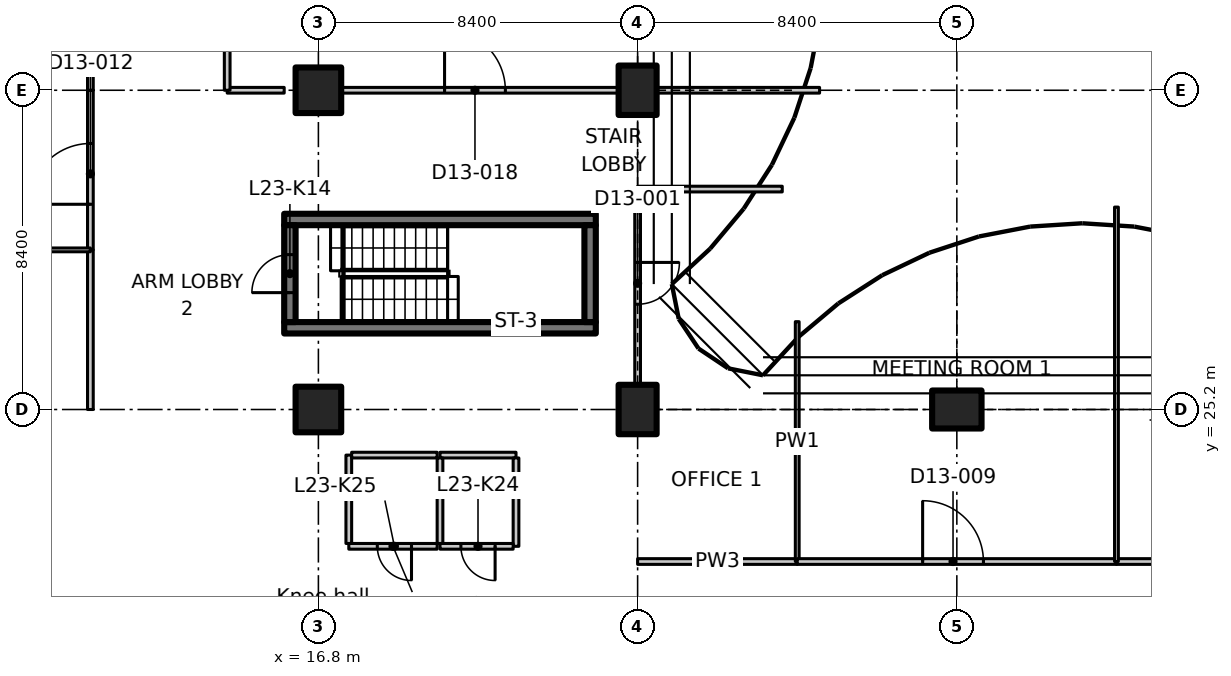
"""IFC4 building model, lengths in metres.
Left out: names, types, materials, properties, quantities, classifications, styles, units other than length and angle.
Written with IfcOpenShell. Run it as: python <this file> out.ifc"""

import sys

from ifc_helpers import new_model, si_unit, direction, frame, frame_2d, origin, origin_2d, place, context, subcontext, project, spatial, polyline, rectangle, outline, extrude, element, fill, save


model = new_model("IFC4")
c1 = context("Model", 3, precision=1e-05, world=origin(), true_north=direction((0.0, 1.0)))
c2 = subcontext(c1, "Body", "Model", "MODEL_VIEW")
j1 = project(units=[si_unit("LENGTHUNIT", "METRE"), si_unit("PLANEANGLEUNIT", "RADIAN")], contexts=[c1])
p1 = place(None, origin())
s1 = spatial("IfcSite", under=j1, at=p1, CompositionType="ELEMENT")
p2 = place(p1, origin())
s2 = spatial("IfcBuilding", under=s1, at=p2, CompositionType="ELEMENT")
p3 = place(p2, frame((0.0, 0.0, 98.9)))
s3 = spatial("IfcBuildingStorey", under=s2, at=p3, CompositionType="ELEMENT", Elevation=98.9)
for number, where, z_axis, x_axis in (
    (1, (16.8, 25.2, 0.0), (0.0, 0.0, 1.0), (1.0, 0.0, 0.0)),
    (2, (16.8, 33.6, 0.0), (0.0, 0.0, 1.0), (1.0, 0.0, 0.0)),
):
    element("IfcColumn", number, at=place(p3, frame(where, z_axis=z_axis, x_axis=x_axis)), inside=s3, PredefinedType="COLUMN", context=c2, shape_type="SweptSolid", body=[
        extrude(rectangle(XDim=1.2, YDim=1.2, at=origin_2d()), origin(), (0.0, 0.0, 1.0), 3.35),
    ])
for number, where, z_axis, x_axis in (
    (3, (25.2, 25.2, 0.0), (0.0, 0.0, 1.0), (1.0, 0.0, 0.0)),
    (4, (25.2, 33.6, 0.0), (0.0, 0.0, 1.0), (1.0, 0.0, 0.0)),
    (5, (33.6, 25.2, 0.0), (0.0, 0.0, 1.0), (0.0, 1.0, 0.0)),
):
    element("IfcColumn", number, at=place(p3, frame(where, z_axis=z_axis, x_axis=x_axis)), inside=s3, PredefinedType="COLUMN", context=c2, shape_type="SweptSolid", body=[
        extrude(rectangle(XDim=1.0, YDim=1.3, at=origin_2d()), origin(), (0.0, 0.0, 1.0), 3.35),
    ])
for number, where, z_axis, x_axis in (
    (6, (15.9, 27.35, 0.0), (0.0, 0.0, 1.0), (1.0, 0.0, 0.0)),
    (7, (15.9, 30.2, 0.0), (0.0, 0.0, 1.0), (1.0, 0.0, 0.0)),
):
    element("IfcWall", number, at=place(p3, frame(where, z_axis=z_axis, x_axis=x_axis)), inside=s3, PredefinedType="SHEAR", context=c2, shape_type="SweptSolid", body=[
        extrude(rectangle(XDim=8.2, YDim=0.3, at=frame_2d((4.1, 0.0))), origin(), (0.0, 0.0, 1.0), 3.35),
    ])
p4 = place(p3, frame((16.05, 27.5, 0.0), z_axis=(0.0, 0.0, 1.0), x_axis=(0.0, 1.0, 0.0)))
e8 = element("IfcWall", 8, at=p4, inside=s3, PredefinedType="SHEAR", context=c2, shape_type="SweptSolid", body=[
    extrude(rectangle(XDim=2.55, YDim=0.3, at=frame_2d((1.275, 0.0))), origin(), (0.0, 0.0, 1.0), 3.35),
])
p5 = place(p4, frame((0.775, 0.0, 0.0)))
e9 = element("IfcOpeningElement", 9, at=p5, cuts=e8, PredefinedType="OPENING", context=c2, shape_type="SweptSolid", body=[
    extrude(rectangle(XDim=1.0, YDim=2.1, at=frame_2d((0.5, 1.05))), frame((0.0, 0.16, 0.0), z_axis=(0.0, -1.0, 0.0), x_axis=(1.0, 0.0, 0.0)), (0.0, 0.0, 1.0), 0.32),
])
p6 = place(p3, frame((23.95, 27.5, 0.0), z_axis=(0.0, 0.0, 1.0), x_axis=(0.0, 1.0, 0.0)))
e10 = element("IfcWall", 10, at=p6, inside=s3, PredefinedType="SHEAR", context=c2, shape_type="SweptSolid", body=[
    extrude(rectangle(XDim=2.55, YDim=0.3, at=frame_2d((1.275, 0.0))), origin(), (0.0, 0.0, 1.0), 3.35),
])
p7 = place(p3, frame((20.0, 24.0, 0.0), z_axis=(0.0, 0.0, 1.0), x_axis=(1.0, 0.0, 0.0)))
e11 = element("IfcWall", 11, at=p7, inside=s3, PredefinedType="PARTITIONING", context=c2, shape_type="SweptSolid", body=[
    extrude(rectangle(XDim=2.0, YDim=0.15, at=frame_2d((1.0, 0.0))), origin(), (0.0, 0.0, 1.0), 3.35),
])
p8 = place(p3, frame((22.0, 23.925, 0.0), z_axis=(0.0, 0.0, 1.0), x_axis=(0.0, -1.0, 0.0)))
e12 = element("IfcWall", 12, at=p8, inside=s3, PredefinedType="PARTITIONING", context=c2, shape_type="SweptSolid", body=[
    extrude(rectangle(XDim=2.325, YDim=0.15, at=frame_2d((1.163, 0.0))), origin(), (0.0, 0.0, 1.0), 3.35),
])
p9 = place(p3, frame((21.925, 21.6, 0.0), z_axis=(0.0, 0.0, 1.0), x_axis=(-1.0, 0.0, 0.0)))
e13 = element("IfcWall", 13, at=p9, inside=s3, PredefinedType="PARTITIONING", context=c2, shape_type="SweptSolid", body=[
    extrude(rectangle(XDim=1.925, YDim=0.15, at=frame_2d((0.962, 0.0))), origin(), (0.0, 0.0, 1.0), 3.35),
])
p10 = place(p9, frame((0.475, 0.0, 0.0)))
e14 = element("IfcOpeningElement", 14, at=p10, cuts=e13, PredefinedType="OPENING", context=c2, shape_type="SweptSolid", body=[
    extrude(rectangle(XDim=0.9, YDim=2.1, at=frame_2d((0.45, 1.05))), frame((0.0, 0.085, 0.0), z_axis=(0.0, -1.0, 0.0), x_axis=(1.0, 0.0, 0.0)), (0.0, 0.0, 1.0), 0.17),
])
p11 = place(p3, frame((20.0, 21.675, 0.0), z_axis=(0.0, 0.0, 1.0), x_axis=(0.0, 1.0, 0.0)))
e15 = element("IfcWall", 15, at=p11, inside=s3, PredefinedType="PARTITIONING", context=c2, shape_type="SweptSolid", body=[
    extrude(rectangle(XDim=2.25, YDim=0.15, at=frame_2d((1.125, 0.0))), origin(), (0.0, 0.0, 1.0), 3.35),
])
p12 = place(p3, frame((19.925, 21.6, 0.0), z_axis=(0.0, 0.0, 1.0), x_axis=(-1.0, 0.0, 0.0)))
e16 = element("IfcWall", 16, at=p12, inside=s3, PredefinedType="PARTITIONING", context=c2, shape_type="SweptSolid", body=[
    extrude(rectangle(XDim=2.325, YDim=0.15, at=frame_2d((1.163, 0.0))), origin(), (0.0, 0.0, 1.0), 3.35),
])
p13 = place(p12, frame((0.675, 0.0, 0.0)))
e17 = element("IfcOpeningElement", 17, at=p13, cuts=e16, PredefinedType="OPENING", context=c2, shape_type="SweptSolid", body=[
    extrude(rectangle(XDim=0.9, YDim=2.1, at=frame_2d((0.45, 1.05))), frame((0.0, 0.085, 0.0), z_axis=(0.0, -1.0, 0.0), x_axis=(1.0, 0.0, 0.0)), (0.0, 0.0, 1.0), 0.17),
])
p14 = place(p3, frame((17.6, 21.675, 0.0), z_axis=(0.0, 0.0, 1.0), x_axis=(0.0, 1.0, 0.0)))
e18 = element("IfcWall", 18, at=p14, inside=s3, PredefinedType="PARTITIONING", context=c2, shape_type="SweptSolid", body=[
    extrude(rectangle(XDim=2.325, YDim=0.15, at=frame_2d((1.163, 0.0))), origin(), (0.0, 0.0, 1.0), 3.35),
])
p15 = place(p3, frame((17.675, 24.0, 0.0), z_axis=(0.0, 0.0, 1.0), x_axis=(1.0, 0.0, 0.0)))
e19 = element("IfcWall", 19, at=p15, inside=s3, PredefinedType="PARTITIONING", context=c2, shape_type="SweptSolid", body=[
    extrude(rectangle(XDim=2.25, YDim=0.15, at=frame_2d((1.125, 0.0))), origin(), (0.0, 0.0, 1.0), 3.35),
])
p16 = place(p3, frame((25.2, 21.2, 0.0), z_axis=(0.0, 0.0, 1.0), x_axis=(1.0, 0.0, 0.0)))
e20 = element("IfcWall", 20, at=p16, inside=s3, PredefinedType="PARTITIONING", context=c2, shape_type="SweptSolid", body=[
    extrude(rectangle(XDim=4.2, YDim=0.15, at=frame_2d((2.1, 0.0))), origin(), (0.0, 0.0, 1.0), 3.33),
])
p17 = place(p3, frame((29.4, 27.511, 0.0), z_axis=(0.0, 0.0, 1.0), x_axis=(0.0, -1.0, 0.0)))
e21 = element("IfcWall", 21, at=p17, inside=s3, PredefinedType="PARTITIONING", context=c2, shape_type="SweptSolid", body=[
    extrude(outline(polyline([(0.0, 0.0), (6.311, 0.0), (6.311, 3.33), (2.761, 3.33), (2.759, 2.98), (1.863, 2.98), (1.861, 3.33), (0.236, 3.33), (0.0, 3.33), (0.0, 0.0)])), frame((0.0, 0.05, 0.0), z_axis=(0.0, -1.0, 0.0), x_axis=(1.0, 0.0, 0.0)), (0.0, 0.0, 1.0), 0.1),
])
p18 = place(p3, frame((25.2, 31.0, 0.0), z_axis=(0.0, 0.0, 1.0), x_axis=(0.0, -1.0, 0.0)))
e22 = element("IfcWall", 22, at=p18, inside=s3, PredefinedType="PARTITIONING", context=c2, shape_type="SweptSolid", body=[
    extrude(outline(polyline([(0.0, 0.0), (5.13, 0.0), (5.13, 2.98), (0.0, 2.98), (0.0, 0.0)])), frame((0.0, 0.075, 0.0), z_axis=(0.0, -1.0, 0.0), x_axis=(1.0, 0.0, 0.0)), (0.0, 0.0, 1.0), 0.15),
])
p19 = place(p18, frame((1.93, 0.0, 0.0)))
e23 = element("IfcOpeningElement", 23, at=p19, cuts=e22, PredefinedType="OPENING", context=c2, shape_type="SweptSolid", body=[
    extrude(rectangle(XDim=1.1, YDim=2.1, at=frame_2d((0.55, 1.05))), frame((0.0, 0.085, 0.0), z_axis=(0.0, -1.0, 0.0), x_axis=(1.0, 0.0, 0.0)), (0.0, 0.0, 1.0), 0.17),
])
p20 = place(p3, frame((25.2, 31.0, 0.0), z_axis=(0.0, 0.0, 1.0), x_axis=(1.0, 0.0, 0.0)))
e24 = element("IfcWall", 24, at=p20, inside=s3, PredefinedType="PARTITIONING", context=c2, shape_type="SweptSolid", body=[
    extrude(rectangle(XDim=3.806, YDim=0.15, at=frame_2d((1.903, 0.0))), origin(), (0.0, 0.0, 1.0), 2.98),
])
p21 = place(p3, frame((29.4, 21.2, 0.0), z_axis=(0.0, 0.0, 1.0), x_axis=(1.0, 0.0, 0.0)))
e25 = element("IfcWall", 25, at=p21, inside=s3, PredefinedType="PARTITIONING", context=c2, shape_type="SweptSolid", body=[
    extrude(rectangle(XDim=8.4, YDim=0.15, at=frame_2d((4.2, 0.0))), origin(), (0.0, 0.0, 1.0), 3.33),
])
p22 = place(p21, frame((3.3, 0.0, 0.0)))
e26 = element("IfcOpeningElement", 26, at=p22, cuts=e25, PredefinedType="OPENING", context=c2, shape_type="SweptSolid", body=[
    extrude(rectangle(XDim=1.6, YDim=2.1, at=frame_2d((0.8, 1.05))), frame((0.0, 0.085, 0.0), z_axis=(0.0, -1.0, 0.0), x_axis=(1.0, 0.0, 0.0)), (0.0, 0.0, 1.0), 0.17),
])
p23 = place(p3, frame((37.8, 21.2, 0.0), z_axis=(0.0, 0.0, 1.0), x_axis=(1.0, 0.0, 0.0)))
e27 = element("IfcWall", 27, at=p23, inside=s3, PredefinedType="PARTITIONING", context=c2, shape_type="SweptSolid", body=[
    extrude(rectangle(XDim=13.2, YDim=0.15, at=frame_2d((6.6, 0.0))), origin(), (0.0, 0.0, 1.0), 3.33),
])
p24 = place(p23, frame((5.7, 0.0, 0.0)))
e28 = element("IfcOpeningElement", 28, at=p24, cuts=e27, PredefinedType="OPENING", context=c2, shape_type="SweptSolid", body=[
    extrude(rectangle(XDim=2.0, YDim=2.4, at=frame_2d((1.0, 1.2))), frame((0.0, 0.085, 0.0), z_axis=(0.0, -1.0, 0.0), x_axis=(1.0, 0.0, 0.0)), (0.0, 0.0, 1.0), 0.17),
])
p25 = place(p3, frame((37.8, 30.526, 0.0), z_axis=(0.0, 0.0, 1.0), x_axis=(0.0, -1.0, 0.0)))
e29 = element("IfcWall", 29, at=p25, inside=s3, PredefinedType="PARTITIONING", context=c2, shape_type="SweptSolid", body=[
    extrude(outline(polyline([(0.0, 0.0), (9.326, 0.0), (9.326, 3.33), (5.776, 3.33), (5.774, 2.98), (4.878, 2.98), (4.876, 3.33), (0.283, 3.33), (0.0, 3.33), (0.0, 0.0)])), frame((0.0, 0.05, 0.0), z_axis=(0.0, -1.0, 0.0), x_axis=(1.0, 0.0, 0.0)), (0.0, 0.0, 1.0), 0.1),
])
p26 = place(p3, frame((10.8, 29.4, 0.0), z_axis=(0.0, 0.0, 1.0), x_axis=(0.0, 1.0, 0.0)))
e30 = element("IfcWall", 30, at=p26, inside=s3, PredefinedType="PARTITIONING", context=c2, shape_type="SweptSolid", body=[
    extrude(rectangle(XDim=4.2, YDim=0.15, at=frame_2d((2.1, 0.0))), origin(), (0.0, 0.0, 1.0), 3.33),
])
p27 = place(p26, frame((1.2, 0.0, 0.0)))
e31 = element("IfcOpeningElement", 31, at=p27, cuts=e30, PredefinedType="OPENING", context=c2, shape_type="SweptSolid", body=[
    extrude(rectangle(XDim=1.6, YDim=2.1, at=frame_2d((0.8, 1.05))), frame((0.0, 0.085, 0.0), z_axis=(0.0, -1.0, 0.0), x_axis=(1.0, 0.0, 0.0)), (0.0, 0.0, 1.0), 0.17),
])
p28 = place(p3, frame((10.8, 25.2, 0.0), z_axis=(0.0, 0.0, 1.0), x_axis=(0.0, 1.0, 0.0)))
e32 = element("IfcWall", 32, at=p28, inside=s3, PredefinedType="PARTITIONING", context=c2, shape_type="SweptSolid", body=[
    extrude(rectangle(XDim=4.2, YDim=0.15, at=frame_2d((2.1, 0.0))), origin(), (0.0, 0.0, 1.0), 3.33),
])
p29 = place(p3, frame((14.4, 33.6, 0.0), z_axis=(0.0, 0.0, 1.0), x_axis=(1.0, 0.0, 0.0)))
e33 = element("IfcWall", 33, at=p29, inside=s3, PredefinedType="PARTITIONING", context=c2, shape_type="SweptSolid", body=[
    extrude(rectangle(XDim=1.5, YDim=0.15, at=frame_2d((0.75, 0.0))), origin(), (0.0, 0.0, 1.0), 3.33),
])
p30 = place(p3, frame((17.42, 33.6, 0.0), z_axis=(0.0, 0.0, 1.0), x_axis=(1.0, 0.0, 0.0)))
e34 = element("IfcWall", 34, at=p30, inside=s3, PredefinedType="PARTITIONING", context=c2, shape_type="SweptSolid", body=[
    extrude(rectangle(XDim=7.26, YDim=0.15, at=frame_2d((3.63, 0.0))), origin(), (0.0, 0.0, 1.0), 3.33),
])
p31 = place(p30, frame((2.7, 0.0, 0.0)))
e35 = element("IfcOpeningElement", 35, at=p31, cuts=e34, PredefinedType="OPENING", context=c2, shape_type="SweptSolid", body=[
    extrude(rectangle(XDim=1.6, YDim=2.1, at=frame_2d((0.8, 1.05))), frame((0.0, 0.085, 0.0), z_axis=(0.0, -1.0, 0.0), x_axis=(1.0, 0.0, 0.0)), (0.0, 0.0, 1.0), 0.17),
])
p32 = place(p3, frame((25.72, 33.6, 0.0), z_axis=(0.0, 0.0, 1.0), x_axis=(1.0, 0.0, 0.0)))
e36 = element("IfcWall", 36, at=p32, inside=s3, PredefinedType="PARTITIONING", context=c2, shape_type="SweptSolid", body=[
    extrude(rectangle(XDim=4.268, YDim=0.15, at=frame_2d((2.134, 0.0))), origin(), (0.0, 0.0, 1.0), 2.98),
])
for number, where, z_axis, x_axis in (
    (37, (10.8, 33.6, 0.0), (0.0, 0.0, 1.0), (0.0, 1.0, 0.0)),
    (38, (14.4, 37.8, 0.0), (0.0, 0.0, 1.0), (0.0, -1.0, 0.0)),
):
    element("IfcWall", number, at=place(p3, frame(where, z_axis=z_axis, x_axis=x_axis)), inside=s3, PredefinedType="PARTITIONING", context=c2, shape_type="SweptSolid", body=[
        extrude(rectangle(XDim=4.2, YDim=0.15, at=frame_2d((2.1, 0.0))), origin(), (0.0, 0.0, 1.0), 3.33),
    ])
p33 = place(p3, frame((10.8, 29.4, 0.0), z_axis=(0.0, 0.0, 1.0), x_axis=(-1.0, 0.0, 0.0)))
e39 = element("IfcWall", 39, at=p33, inside=s3, PredefinedType="PARTITIONING", context=c2, shape_type="SweptSolid", body=[
    extrude(rectangle(XDim=7.8, YDim=0.1, at=frame_2d((3.9, 0.0))), origin(), (0.0, 0.0, 1.0), 3.33),
])
p34 = place(p33, frame((3.3, 0.0, 0.0)))
e40 = element("IfcOpeningElement", 40, at=p34, cuts=e39, PredefinedType="OPENING", context=c2, shape_type="SweptSolid", body=[
    extrude(rectangle(XDim=1.0, YDim=2.1, at=frame_2d((0.5, 1.05))), frame((0.0, 0.06, 0.0), z_axis=(0.0, -1.0, 0.0), x_axis=(1.0, 0.0, 0.0)), (0.0, 0.0, 1.0), 0.12),
])
p35 = place(p5, origin())
e41 = element("IfcDoor", 41, at=p35, inside=s3, OperationType="SINGLE_SWING_RIGHT", PredefinedType="DOOR", context=c2, shape_type="SweptSolid", body=[
    extrude(rectangle(XDim=1.0, YDim=2.1, at=frame_2d((0.5, 1.05))), frame((0.0, 0.025, 0.0), z_axis=(0.0, -1.0, 0.0), x_axis=(1.0, 0.0, 0.0)), (0.0, 0.0, 1.0), 0.05),
])
fill(e9, e41)
p36 = place(p10, origin())
e42 = element("IfcDoor", 42, at=p36, inside=s3, OperationType="SINGLE_SWING_RIGHT", PredefinedType="DOOR", context=c2, shape_type="SweptSolid", body=[
    extrude(rectangle(XDim=0.9, YDim=2.1, at=frame_2d((0.45, 1.05))), frame((0.0, 0.025, 0.0), z_axis=(0.0, -1.0, 0.0), x_axis=(1.0, 0.0, 0.0)), (0.0, 0.0, 1.0), 0.05),
])
fill(e14, e42)
p37 = place(p13, origin())
e43 = element("IfcDoor", 43, at=p37, inside=s3, OperationType="SINGLE_SWING_LEFT", PredefinedType="DOOR", context=c2, shape_type="SweptSolid", body=[
    extrude(rectangle(XDim=0.9, YDim=2.1, at=frame_2d((0.45, 1.05))), frame((0.0, 0.025, 0.0), z_axis=(0.0, -1.0, 0.0), x_axis=(1.0, 0.0, 0.0)), (0.0, 0.0, 1.0), 0.05),
])
fill(e17, e43)
p38 = place(p19, origin())
e44 = element("IfcDoor", 44, at=p38, inside=s3, OperationType="SINGLE_SWING_RIGHT", PredefinedType="DOOR", context=c2, shape_type="SweptSolid", body=[
    extrude(rectangle(XDim=1.1, YDim=2.1, at=frame_2d((0.55, 1.05))), frame((0.0, 0.025, 0.0), z_axis=(0.0, -1.0, 0.0), x_axis=(1.0, 0.0, 0.0)), (0.0, 0.0, 1.0), 0.05),
])
fill(e23, e44)
p39 = place(p22, origin())
e45 = element("IfcDoor", 45, at=p39, inside=s3, OperationType="DOUBLE_DOOR_SINGLE_SWING", PredefinedType="DOOR", context=c2, shape_type="SweptSolid", body=[
    extrude(rectangle(XDim=1.6, YDim=2.1, at=frame_2d((0.8, 1.05))), frame((0.0, 0.025, 0.0), z_axis=(0.0, -1.0, 0.0), x_axis=(1.0, 0.0, 0.0)), (0.0, 0.0, 1.0), 0.05),
])
fill(e26, e45)
p40 = place(p27, origin())
e46 = element("IfcDoor", 46, at=p40, inside=s3, OperationType="DOUBLE_DOOR_SINGLE_SWING", PredefinedType="DOOR", context=c2, shape_type="SweptSolid", body=[
    extrude(rectangle(XDim=1.6, YDim=2.1, at=frame_2d((0.8, 1.05))), frame((0.0, 0.025, 0.0), z_axis=(0.0, -1.0, 0.0), x_axis=(1.0, 0.0, 0.0)), (0.0, 0.0, 1.0), 0.05),
])
fill(e31, e46)
p41 = place(p31, origin())
e47 = element("IfcDoor", 47, at=p41, inside=s3, OperationType="DOUBLE_DOOR_SINGLE_SWING", PredefinedType="DOOR", context=c2, shape_type="SweptSolid", body=[
    extrude(rectangle(XDim=1.6, YDim=2.1, at=frame_2d((0.8, 1.05))), frame((0.0, 0.025, 0.0), z_axis=(0.0, -1.0, 0.0), x_axis=(1.0, 0.0, 0.0)), (0.0, 0.0, 1.0), 0.05),
])
fill(e35, e47)
save(model, sys.argv[1])
